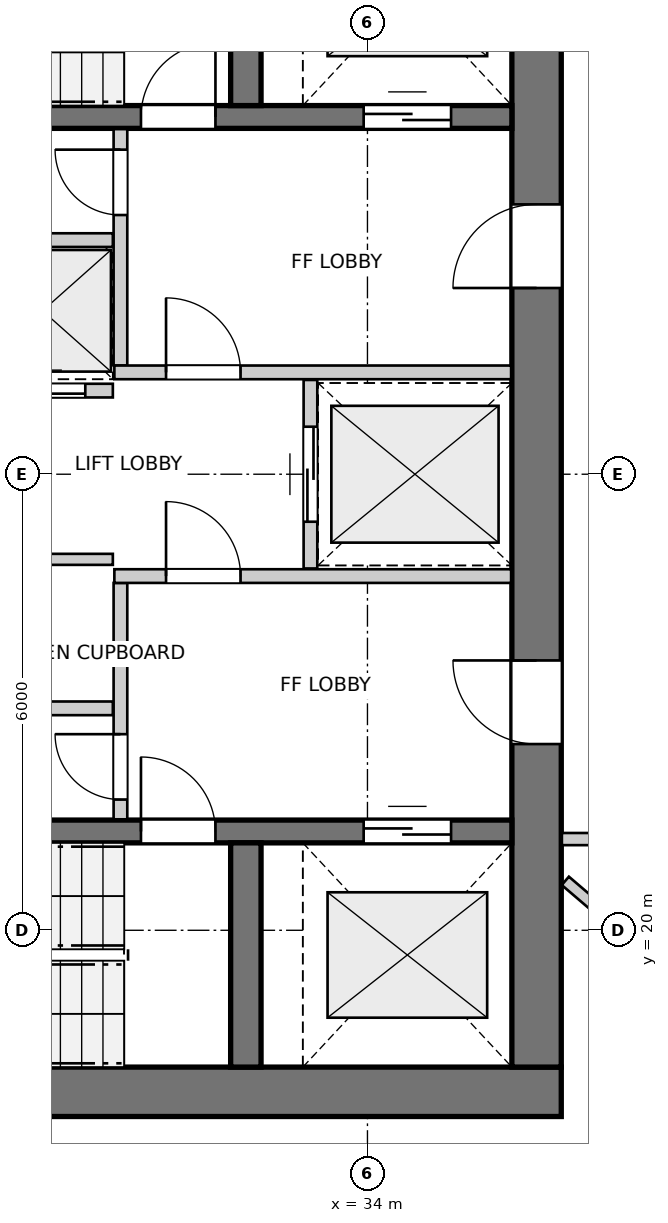
"""IFC4 building model, lengths in metres.
Left out: names, types, materials, properties, quantities, classifications, styles, units other than length and angle.
Written with IfcOpenShell. Run it as: python <this file> out.ifc"""

import sys

from ifc_helpers import new_model, si_unit, direction, frame, frame_2d, origin, place, context, subcontext, project, spatial, rectangle, extrude, source, transform, mapped, element, fill, save


model = new_model("IFC4")
c1 = context("Model", 3, precision=1e-05, world=origin(), true_north=direction((0.0, 1.0)))
c2 = subcontext(c1, "Body", "Model", "MODEL_VIEW")
j1 = project(units=[si_unit("LENGTHUNIT", "METRE"), si_unit("PLANEANGLEUNIT", "RADIAN")], contexts=[c1])
p1 = place(None, origin())
s1 = spatial("IfcSite", under=j1, at=p1, CompositionType="ELEMENT")
p2 = place(p1, origin())
s2 = spatial("IfcBuilding", under=s1, at=p2, CompositionType="ELEMENT")
p3 = place(p2, frame((0.0, 0.0, 181.0)))
s3 = spatial("IfcBuildingStorey", under=s2, at=p3, CompositionType="ELEMENT", Elevation=181.0)
p4 = place(p3, frame((24.15, 17.875, 0.0), z_axis=(0.0, 0.0, 1.0), x_axis=(1.0, 0.0, 0.0)))
e1 = element("IfcWall", 1, at=p4, inside=s3, PredefinedType="SHEAR", context=c2, shape_type="SweptSolid", body=[
    extrude(rectangle(XDim=12.4, YDim=0.65, at=frame_2d((6.2, 0.0))), origin(), (0.0, 0.0, 1.0), 2.95),
])
p5 = place(p3, frame((36.225, 18.2, 0.0), z_axis=(0.0, 0.0, 1.0), x_axis=(0.0, 1.0, 0.0)))
e2 = element("IfcWall", 2, at=p5, inside=s3, PredefinedType="SHEAR", context=c2, shape_type="SweptSolid", body=[
    extrude(rectangle(XDim=15.6, YDim=0.65, at=frame_2d((7.8, 0.0))), origin(), (0.0, 0.0, 1.0), 2.95),
])
p6 = place(p5, frame((4.25, 0.0, 0.0)))
e3 = element("IfcOpeningElement", 3, at=p6, cuts=e2, PredefinedType="OPENING", context=c2, shape_type="SweptSolid", body=[
    extrude(rectangle(XDim=1.1, YDim=2.15, at=frame_2d((0.55, 1.075))), frame((0.0, 0.335, 0.0), z_axis=(0.0, -1.0, 0.0), x_axis=(1.0, 0.0, 0.0)), (0.0, 0.0, 1.0), 0.67),
])
p7 = place(p5, frame((10.25, 0.0, 0.0)))
e4 = element("IfcOpeningElement", 4, at=p7, cuts=e2, PredefinedType="OPENING", context=c2, shape_type="SweptSolid", body=[
    extrude(rectangle(XDim=1.1, YDim=2.15, at=frame_2d((0.55, 1.075))), frame((0.0, 0.335, 0.0), z_axis=(0.0, -1.0, 0.0), x_axis=(1.0, 0.0, 0.0)), (0.0, 0.0, 1.0), 0.67),
])
p8 = place(p3, frame((24.8, 21.3, 0.0), z_axis=(0.0, 0.0, 1.0), x_axis=(1.0, 0.0, 0.0)))
e5 = element("IfcWall", 5, at=p8, inside=s3, PredefinedType="SHEAR", context=c2, shape_type="SweptSolid", body=[
    extrude(rectangle(XDim=11.1, YDim=0.3, at=frame_2d((5.55, 0.0))), origin(), (0.0, 0.0, 1.0), 2.95),
])
p9 = place(p8, frame((6.22, 0.0, 0.0)))
e6 = element("IfcOpeningElement", 6, at=p9, cuts=e5, PredefinedType="OPENING", context=c2, shape_type="SweptSolid", body=[
    extrude(rectangle(XDim=0.98, YDim=2.15, at=frame_2d((0.49, 1.075))), frame((0.0, 0.16, 0.0), z_axis=(0.0, -1.0, 0.0), x_axis=(1.0, 0.0, 0.0)), (0.0, 0.0, 1.0), 0.32),
])
p10 = place(p8, frame((9.15, 0.0, 0.0)))
e7 = element("IfcOpeningElement", 7, at=p10, cuts=e5, PredefinedType="OPENING", context=c2, shape_type="SweptSolid", body=[
    extrude(rectangle(XDim=1.15, YDim=2.15, at=frame_2d((0.575, 1.075))), frame((0.0, 0.16, 0.0), z_axis=(0.0, -1.0, 0.0), x_axis=(1.0, 0.0, 0.0)), (0.0, 0.0, 1.0), 0.32),
])
p11 = place(p3, frame((32.4, 18.2, 0.0), z_axis=(0.0, 0.0, 1.0), x_axis=(0.0, 1.0, 0.0)))
e8 = element("IfcWall", 8, at=p11, inside=s3, PredefinedType="SHEAR", context=c2, shape_type="SweptSolid", body=[
    extrude(rectangle(XDim=2.95, YDim=0.4, at=frame_2d((1.475, 0.0))), origin(), (0.0, 0.0, 1.0), 2.95),
])
p12 = place(p3, frame((24.8, 30.7, 0.0), z_axis=(0.0, 0.0, 1.0), x_axis=(1.0, 0.0, 0.0)))
e9 = element("IfcWall", 9, at=p12, inside=s3, PredefinedType="SHEAR", context=c2, shape_type="SweptSolid", body=[
    extrude(rectangle(XDim=11.1, YDim=0.3, at=frame_2d((5.55, 0.0))), origin(), (0.0, 0.0, 1.0), 2.95),
])
p13 = place(p12, frame((6.22, 0.0, 0.0)))
e10 = element("IfcOpeningElement", 10, at=p13, cuts=e9, PredefinedType="OPENING", context=c2, shape_type="SweptSolid", body=[
    extrude(rectangle(XDim=0.98, YDim=2.15, at=frame_2d((0.49, 1.075))), frame((0.0, 0.16, 0.0), z_axis=(0.0, -1.0, 0.0), x_axis=(1.0, 0.0, 0.0)), (0.0, 0.0, 1.0), 0.32),
])
p14 = place(p12, frame((9.15, 0.0, 0.0)))
e11 = element("IfcOpeningElement", 11, at=p14, cuts=e9, PredefinedType="OPENING", context=c2, shape_type="SweptSolid", body=[
    extrude(rectangle(XDim=1.15, YDim=2.15, at=frame_2d((0.575, 1.075))), frame((0.0, 0.16, 0.0), z_axis=(0.0, -1.0, 0.0), x_axis=(1.0, 0.0, 0.0)), (0.0, 0.0, 1.0), 0.32),
])
p15 = place(p3, frame((32.4, 30.85, 0.0), z_axis=(0.0, 0.0, 1.0), x_axis=(0.0, 1.0, 0.0)))
e12 = element("IfcWall", 12, at=p15, inside=s3, PredefinedType="SHEAR", context=c2, shape_type="SweptSolid", body=[
    extrude(rectangle(XDim=2.95, YDim=0.4, at=frame_2d((1.475, 0.0))), origin(), (0.0, 0.0, 1.0), 2.95),
])
p16 = place(p3, frame((30.75, 21.46, 0.0), z_axis=(0.0, 0.0, 1.0), x_axis=(0.0, 1.0, 0.0)))
e13 = element("IfcWall", 13, at=p16, inside=s3, PredefinedType="PARTITIONING", context=c2, shape_type="SweptSolid", body=[
    extrude(rectangle(XDim=3.11, YDim=0.18, at=frame_2d((1.555, 0.0))), origin(), (0.0, 0.0, 1.0), 2.95),
])
p17 = place(p16, frame((0.26, 0.0, 0.0)))
e14 = element("IfcOpeningElement", 14, at=p17, cuts=e13, PredefinedType="OPENING", context=c2, shape_type="SweptSolid", body=[
    extrude(rectangle(XDim=0.86, YDim=2.05, at=frame_2d((0.43, 1.025))), frame((0.0, 0.1, 0.0), z_axis=(0.0, -1.0, 0.0), x_axis=(1.0, 0.0, 0.0)), (0.0, 0.0, 1.0), 0.2),
])
p18 = place(p3, frame((30.67, 24.66, 0.0), z_axis=(0.0, 0.0, 1.0), x_axis=(1.0, 0.0, 0.0)))
e15 = element("IfcWall", 15, at=p18, inside=s3, PredefinedType="PARTITIONING", context=c2, shape_type="SweptSolid", body=[
    extrude(rectangle(XDim=5.22, YDim=0.18, at=frame_2d((2.61, 0.0))), origin(), (0.0, 0.0, 1.0), 2.95),
])
p19 = place(p18, frame((0.68, 0.0, 0.0)))
e16 = element("IfcOpeningElement", 16, at=p19, cuts=e15, PredefinedType="OPENING", context=c2, shape_type="SweptSolid", body=[
    extrude(rectangle(XDim=0.98, YDim=2.15, at=frame_2d((0.49, 1.075))), frame((0.0, 0.1, 0.0), z_axis=(0.0, -1.0, 0.0), x_axis=(1.0, 0.0, 0.0)), (0.0, 0.0, 1.0), 0.2),
])
p20 = place(p3, frame((30.75, 27.43, 0.0), z_axis=(0.0, 0.0, 1.0), x_axis=(0.0, 1.0, 0.0)))
e17 = element("IfcWall", 17, at=p20, inside=s3, PredefinedType="PARTITIONING", context=c2, shape_type="SweptSolid", body=[
    extrude(rectangle(XDim=3.11, YDim=0.18, at=frame_2d((1.555, 0.0))), origin(), (0.0, 0.0, 1.0), 2.95),
])
p21 = place(p20, frame((1.98, 0.0, 0.0)))
e18 = element("IfcOpeningElement", 18, at=p21, cuts=e17, PredefinedType="OPENING", context=c2, shape_type="SweptSolid", body=[
    extrude(rectangle(XDim=0.86, YDim=2.05, at=frame_2d((0.43, 1.025))), frame((0.0, 0.1, 0.0), z_axis=(0.0, -1.0, 0.0), x_axis=(1.0, 0.0, 0.0)), (0.0, 0.0, 1.0), 0.2),
])
p22 = place(p3, frame((30.67, 27.34, 0.0), z_axis=(0.0, 0.0, 1.0), x_axis=(1.0, 0.0, 0.0)))
e19 = element("IfcWall", 19, at=p22, inside=s3, PredefinedType="PARTITIONING", context=c2, shape_type="SweptSolid", body=[
    extrude(rectangle(XDim=5.22, YDim=0.18, at=frame_2d((2.61, 0.0))), origin(), (0.0, 0.0, 1.0), 2.95),
])
p23 = place(p22, frame((0.68, 0.0, 0.0)))
e20 = element("IfcOpeningElement", 20, at=p23, cuts=e19, PredefinedType="OPENING", context=c2, shape_type="SweptSolid", body=[
    extrude(rectangle(XDim=0.98, YDim=2.15, at=frame_2d((0.49, 1.075))), frame((0.0, 0.1, 0.0), z_axis=(0.0, -1.0, 0.0), x_axis=(1.0, 0.0, 0.0)), (0.0, 0.0, 1.0), 0.2),
])
p24 = place(p3, frame((33.25, 24.76, 0.0), z_axis=(0.0, 0.0, 1.0), x_axis=(0.0, 1.0, 0.0)))
e21 = element("IfcWall", 21, at=p24, inside=s3, PredefinedType="PARTITIONING", context=c2, shape_type="SweptSolid", body=[
    extrude(rectangle(XDim=2.48, YDim=0.18, at=frame_2d((1.24, 0.0))), origin(), (0.0, 0.0, 1.0), 2.95),
])
p25 = place(p24, frame((0.615, 0.0, 0.0)))
e22 = element("IfcOpeningElement", 22, at=p25, cuts=e21, PredefinedType="OPENING", context=c2, shape_type="SweptSolid", body=[
    extrude(rectangle(XDim=1.25, YDim=2.15, at=frame_2d((0.625, 1.075))), frame((0.0, 0.1, 0.0), z_axis=(0.0, -1.0, 0.0), x_axis=(1.0, 0.0, 0.0)), (0.0, 0.0, 1.0), 0.2),
])
p26 = place(p3, frame((24.81, 22.92, 0.0), z_axis=(0.0, 0.0, 1.0), x_axis=(1.0, 0.0, 0.0)))
e23 = element("IfcWall", 23, at=p26, inside=s3, PredefinedType="PARTITIONING", context=c2, shape_type="SweptSolid", body=[
    extrude(rectangle(XDim=5.84, YDim=0.18, at=frame_2d((2.92, 0.0))), origin(), (0.0, 0.0, 1.0), 2.95),
])
p27 = place(p3, frame((28.13, 24.88, 0.0), z_axis=(0.0, 0.0, 1.0), x_axis=(1.0, 0.0, 0.0)))
e24 = element("IfcWall", 24, at=p27, inside=s3, PredefinedType="PARTITIONING", context=c2, shape_type="SweptSolid", body=[
    extrude(rectangle(XDim=2.52, YDim=0.145, at=frame_2d((1.26, 0.0))), origin(), (0.0, 0.0, 1.0), 2.95),
])
p28 = place(p27, frame((0.82, 0.0, 0.0)))
e25 = element("IfcOpeningElement", 25, at=p28, cuts=e24, PredefinedType="OPENING", context=c2, shape_type="SweptSolid", body=[
    extrude(rectangle(XDim=0.86, YDim=2.05, at=frame_2d((0.43, 1.025))), frame((0.0, 0.083, 0.0), z_axis=(0.0, -1.0, 0.0), x_axis=(1.0, 0.0, 0.0)), (0.0, 0.0, 1.0), 0.165),
])
p29 = place(p3, frame((24.81, 29.08, 0.0), z_axis=(0.0, 0.0, 1.0), x_axis=(1.0, 0.0, 0.0)))
e26 = element("IfcWall", 26, at=p29, inside=s3, PredefinedType="PARTITIONING", context=c2, shape_type="SweptSolid", body=[
    extrude(rectangle(XDim=5.84, YDim=0.18, at=frame_2d((2.92, 0.0))), origin(), (0.0, 0.0, 1.0), 2.95),
])
p30 = place(p3, frame((28.825, 27.1, 0.0), z_axis=(0.0, 0.0, 1.0), x_axis=(1.0, 0.0, 0.0)))
e27 = element("IfcWall", 27, at=p30, inside=s3, PredefinedType="PARTITIONING", context=c2, shape_type="SweptSolid", body=[
    extrude(rectangle(XDim=1.825, YDim=0.18, at=frame_2d((0.913, 0.0))), origin(), (0.0, 0.0, 1.0), 2.95),
])
p31 = place(p30, frame((0.363, 0.0, 0.0)))
e28 = element("IfcOpeningElement", 28, at=p31, cuts=e27, PredefinedType="OPENING", context=c2, shape_type="SweptSolid", body=[
    extrude(rectangle(XDim=1.1, YDim=2.15, at=frame_2d((0.55, 1.075))), frame((0.0, 0.1, 0.0), z_axis=(0.0, -1.0, 0.0), x_axis=(1.0, 0.0, 0.0)), (0.0, 0.0, 1.0), 0.2),
])
p32 = place(p3, frame((38.33, 21.2, 0.0), z_axis=(0.0, 0.0, 1.0), x_axis=(-1.0, 0.0, 0.0)))
e29 = element("IfcWall", 29, at=p32, inside=s3, PredefinedType="PARTITIONING", context=c2, shape_type="SweptSolid", body=[
    extrude(rectangle(XDim=1.772, YDim=0.16, at=frame_2d((0.886, 0.0))), origin(), (0.0, 0.0, 1.0), 2.95),
])
p33 = place(p32, frame((0.41, 0.0, 0.0)))
e30 = element("IfcOpeningElement", 30, at=p33, cuts=e29, PredefinedType="OPENING", context=c2, shape_type="SweptSolid", body=[
    extrude(rectangle(XDim=0.96, YDim=2.1, at=frame_2d((0.48, 1.05))), frame((0.0, 0.09, 0.0), z_axis=(0.0, -1.0, 0.0), x_axis=(1.0, 0.0, 0.0)), (0.0, 0.0, 1.0), 0.18),
])
p34 = place(p3, frame((36.603, 20.65, 0.0), z_axis=(0.0, 0.0, 1.0), x_axis=(0.759924803985, -0.650010993975, 0.0)))
e31 = element("IfcWall", 31, at=p34, inside=s3, PredefinedType="PARTITIONING", context=c2, shape_type="SweptSolid", body=[
    extrude(rectangle(XDim=7.294, YDim=0.145, at=frame_2d((3.647, 0.0))), origin(), (0.0, 0.0, 1.0), 2.95),
])
m1 = source(origin(), c2, "Body", "SweptSolid", [
    extrude(rectangle(XDim=0.98, YDim=2.15, at=frame_2d((0.49, 1.075))), frame((0.0, 0.025, 0.0), z_axis=(0.0, -1.0, 0.0), x_axis=(1.0, 0.0, 0.0)), (0.0, 0.0, 1.0), 0.05),
])
p35 = place(p9, origin())
e32 = element("IfcDoor", 32, at=p35, inside=s3, OperationType="SINGLE_SWING_LEFT", PredefinedType="DOOR", context=c2, shape_type="MappedRepresentation", body=[
    mapped(m1, transform((0.0, 0.0, 0.0), x_axis=(1.0, 0.0, 0.0), y_axis=(0.0, 1.0, 0.0), z_axis=(0.0, 0.0, 1.0), scale=1.0)),
])
fill(e6, e32)
m2 = source(origin(), c2, "Body", "SweptSolid", [
    extrude(rectangle(XDim=1.15, YDim=2.15, at=frame_2d((0.575, 1.075))), frame((0.0, 0.025, 0.0), z_axis=(0.0, -1.0, 0.0), x_axis=(1.0, 0.0, 0.0)), (0.0, 0.0, 1.0), 0.05),
])
p36 = place(p10, origin())
e33 = element("IfcDoor", 33, at=p36, inside=s3, OperationType="DOUBLE_DOOR_SLIDING", PredefinedType="DOOR", context=c2, shape_type="MappedRepresentation", body=[
    mapped(m2, transform((0.0, 0.0, 0.0), x_axis=(1.0, 0.0, 0.0), y_axis=(0.0, 1.0, 0.0), z_axis=(0.0, 0.0, 1.0), scale=1.0)),
])
fill(e7, e33)
p37 = place(p13, origin())
e34 = element("IfcDoor", 34, at=p37, inside=s3, OperationType="SINGLE_SWING_RIGHT", PredefinedType="DOOR", context=c2, shape_type="MappedRepresentation", body=[
    mapped(m1, transform((0.0, 0.0, 0.0), x_axis=(1.0, 0.0, 0.0), y_axis=(0.0, 1.0, 0.0), z_axis=(0.0, 0.0, 1.0), scale=1.0)),
])
fill(e10, e34)
p38 = place(p14, origin())
e35 = element("IfcDoor", 35, at=p38, inside=s3, OperationType="DOUBLE_DOOR_SLIDING", PredefinedType="DOOR", context=c2, shape_type="MappedRepresentation", body=[
    mapped(m2, transform((0.0, 0.0, 0.0), x_axis=(1.0, 0.0, 0.0), y_axis=(0.0, 1.0, 0.0), z_axis=(0.0, 0.0, 1.0), scale=1.0)),
])
fill(e11, e35)
m3 = source(origin(), c2, "Body", "SweptSolid", [
    extrude(rectangle(XDim=1.1, YDim=2.15, at=frame_2d((0.55, 1.075))), frame((0.0, 0.025, 0.0), z_axis=(0.0, -1.0, 0.0), x_axis=(1.0, 0.0, 0.0)), (0.0, 0.0, 1.0), 0.05),
])
p39 = place(p6, origin())
e36 = element("IfcDoor", 36, at=p39, inside=s3, OperationType="SINGLE_SWING_RIGHT", PredefinedType="DOOR", context=c2, shape_type="MappedRepresentation", body=[
    mapped(m3, transform((0.0, 0.0, 0.0), x_axis=(1.0, 0.0, 0.0), y_axis=(0.0, 1.0, 0.0), z_axis=(0.0, 0.0, 1.0), scale=1.0)),
])
fill(e3, e36)
p40 = place(p7, origin())
e37 = element("IfcDoor", 37, at=p40, inside=s3, OperationType="SINGLE_SWING_LEFT", PredefinedType="DOOR", context=c2, shape_type="MappedRepresentation", body=[
    mapped(m3, transform((0.0, 0.0, 0.0), x_axis=(1.0, 0.0, 0.0), y_axis=(0.0, 1.0, 0.0), z_axis=(0.0, 0.0, 1.0), scale=1.0)),
])
fill(e4, e37)
m4 = source(origin(), c2, "Body", "SweptSolid", [
    extrude(rectangle(XDim=0.86, YDim=2.05, at=frame_2d((0.43, 1.025))), frame((0.0, 0.025, 0.0), z_axis=(0.0, -1.0, 0.0), x_axis=(1.0, 0.0, 0.0)), (0.0, 0.0, 1.0), 0.05),
])
p41 = place(p17, origin())
e38 = element("IfcDoor", 38, at=p41, inside=s3, OperationType="SINGLE_SWING_RIGHT", PredefinedType="DOOR", context=c2, shape_type="MappedRepresentation", body=[
    mapped(m4, transform((0.0, 0.0, 0.0), x_axis=(1.0, 0.0, 0.0), y_axis=(0.0, 1.0, 0.0), z_axis=(0.0, 0.0, 1.0), scale=1.0)),
])
fill(e14, e38)
p42 = place(p19, origin())
e39 = element("IfcDoor", 39, at=p42, inside=s3, OperationType="SINGLE_SWING_LEFT", PredefinedType="DOOR", context=c2, shape_type="MappedRepresentation", body=[
    mapped(m1, transform((0.0, 0.0, 0.0), x_axis=(1.0, 0.0, 0.0), y_axis=(0.0, 1.0, 0.0), z_axis=(0.0, 0.0, 1.0), scale=1.0)),
])
fill(e16, e39)
p43 = place(p21, origin())
e40 = element("IfcDoor", 40, at=p43, inside=s3, OperationType="SINGLE_SWING_RIGHT", PredefinedType="DOOR", context=c2, shape_type="MappedRepresentation", body=[
    mapped(m4, transform((0.0, 0.0, 0.0), x_axis=(1.0, 0.0, 0.0), y_axis=(0.0, 1.0, 0.0), z_axis=(0.0, 0.0, 1.0), scale=1.0)),
])
fill(e18, e40)
p44 = place(p23, origin())
e41 = element("IfcDoor", 41, at=p44, inside=s3, OperationType="SINGLE_SWING_LEFT", PredefinedType="DOOR", context=c2, shape_type="MappedRepresentation", body=[
    mapped(m1, transform((0.0, 0.0, 0.0), x_axis=(1.0, 0.0, 0.0), y_axis=(0.0, 1.0, 0.0), z_axis=(0.0, 0.0, 1.0), scale=1.0)),
])
fill(e20, e41)
m5 = source(origin(), c2, "Body", "SweptSolid", [
    extrude(rectangle(XDim=1.25, YDim=2.15, at=frame_2d((0.625, 1.075))), frame((0.0, 0.025, 0.0), z_axis=(0.0, -1.0, 0.0), x_axis=(1.0, 0.0, 0.0)), (0.0, 0.0, 1.0), 0.05),
])
p45 = place(p25, origin())
e42 = element("IfcDoor", 42, at=p45, inside=s3, OperationType="DOUBLE_DOOR_SLIDING", PredefinedType="DOOR", context=c2, shape_type="MappedRepresentation", body=[
    mapped(m5, transform((0.0, 0.0, 0.0), x_axis=(1.0, 0.0, 0.0), y_axis=(0.0, 1.0, 0.0), z_axis=(0.0, 0.0, 1.0), scale=1.0)),
])
fill(e22, e42)
p46 = place(p31, origin())
e43 = element("IfcDoor", 43, at=p46, inside=s3, OperationType="DOUBLE_DOOR_SLIDING", PredefinedType="DOOR", context=c2, shape_type="MappedRepresentation", body=[
    mapped(m3, transform((0.0, 0.0, 0.0), x_axis=(1.0, 0.0, 0.0), y_axis=(0.0, 1.0, 0.0), z_axis=(0.0, 0.0, 1.0), scale=1.0)),
])
fill(e28, e43)
save(model, sys.argv[1])
